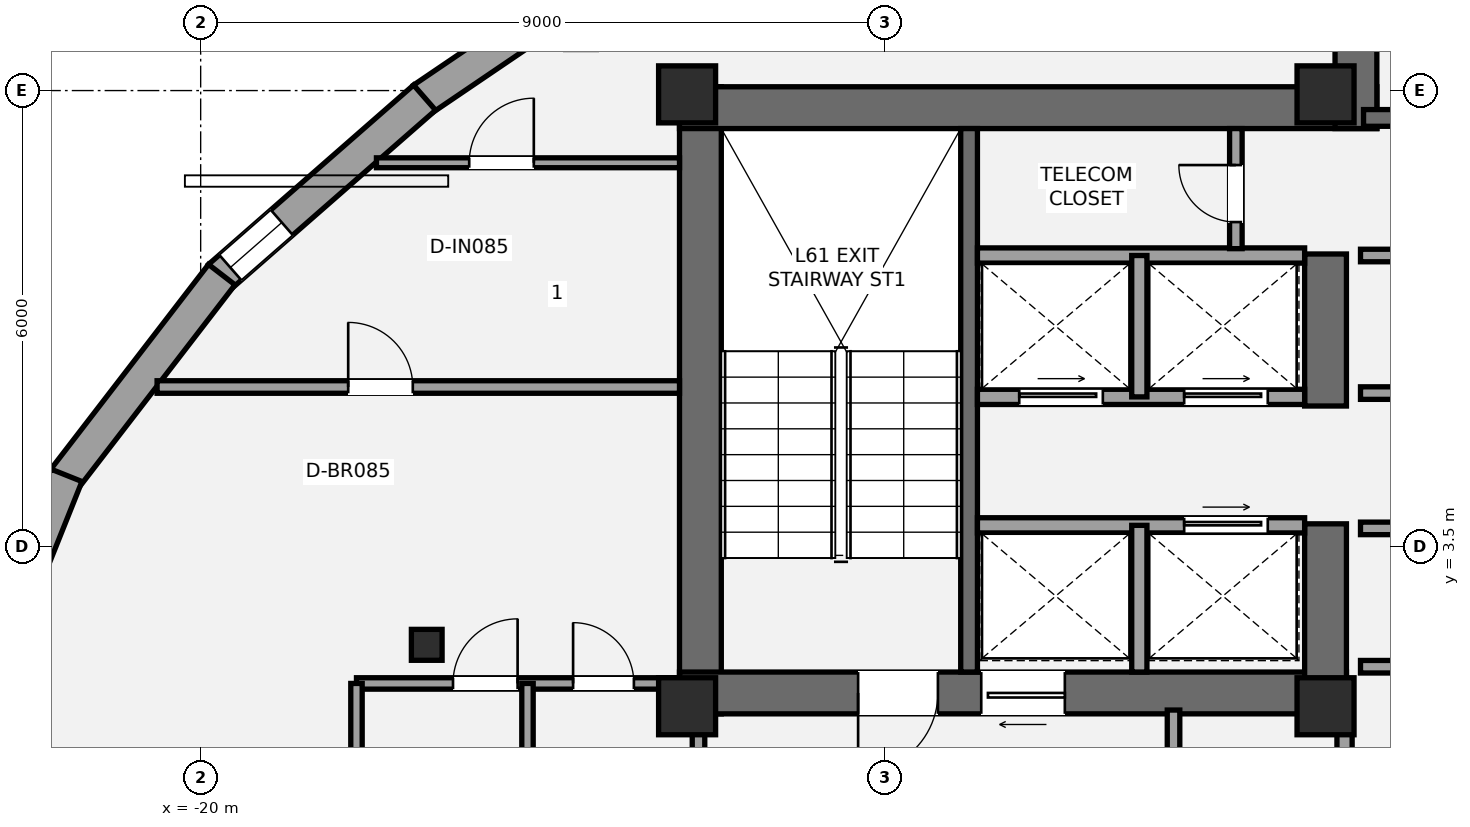
"""IFC4 building model, lengths in metres.
Left out: names, types, materials, properties, quantities, classifications, styles, units other than length and angle.
Written with IfcOpenShell. Run it as: python <this file> out.ifc"""

import sys

from ifc_helpers import new_model, si_unit, direction, frame, frame_2d, origin, origin_2d, place, context, subcontext, project, spatial, rectangle, i_section, extrude, element, fill, save


model = new_model("IFC4")
c1 = context("Model", 3, precision=1e-05, world=origin(), true_north=direction((0.0, 1.0)))
c2 = subcontext(c1, "Body", "Model", "MODEL_VIEW")
j1 = project(units=[si_unit("LENGTHUNIT", "METRE"), si_unit("PLANEANGLEUNIT", "RADIAN")], contexts=[c1])
p1 = place(None, origin())
s1 = spatial("IfcSite", under=j1, at=p1, CompositionType="ELEMENT")
p2 = place(p1, origin())
s2 = spatial("IfcBuilding", under=s1, at=p2, CompositionType="ELEMENT")
p3 = place(p2, frame((0.0, 0.0, 219.45)))
s3 = spatial("IfcBuildingStorey", under=s2, at=p3, CompositionType="ELEMENT", Elevation=219.45)
p4 = place(p3, frame((-13.425, 1.3, 0.0), z_axis=(0.0, 0.0, 1.0), x_axis=(0.0, 1.0, 0.0)))
e1 = element("IfcWall", 1, at=p4, inside=s3, PredefinedType="SHEAR", context=c2, shape_type="SweptSolid", body=[
    extrude(rectangle(XDim=8.25, YDim=0.55, at=frame_2d((4.125, 0.0))), origin(), (0.0, 0.0, 1.0), 3.15),
])
p5 = place(p3, frame((-13.7, 9.275, 0.0), z_axis=(0.0, 0.0, 1.0), x_axis=(1.0, 0.0, 0.0)))
e2 = element("IfcWall", 2, at=p5, inside=s3, PredefinedType="SHEAR", context=c2, shape_type="SweptSolid", body=[
    extrude(rectangle(XDim=9.175, YDim=0.55, at=frame_2d((4.587, 0.0))), origin(), (0.0, 0.0, 1.0), 3.15),
])
p6 = place(p3, frame((-4.925, 1.575, 0.0), z_axis=(0.0, 0.0, 1.0), x_axis=(-1.0, 0.0, 0.0)))
e3 = element("IfcWall", 3, at=p6, inside=s3, PredefinedType="SHEAR", context=c2, shape_type="SweptSolid", body=[
    extrude(rectangle(XDim=8.775, YDim=0.55, at=frame_2d((4.387, 0.0))), origin(), (0.0, 0.0, 1.0), 3.15),
])
p7 = place(p6, frame((5.375, 0.0, 0.0)))
e4 = element("IfcOpeningElement", 4, at=p7, cuts=e3, PredefinedType="OPENING", context=c2, shape_type="SweptSolid", body=[
    extrude(rectangle(XDim=1.05, YDim=2.15, at=frame_2d((0.525, 1.075))), frame((0.0, 0.285, 0.0), z_axis=(0.0, -1.0, 0.0), x_axis=(1.0, 0.0, 0.0)), (0.0, 0.0, 1.0), 0.57),
])
p8 = place(p6, frame((3.705, 0.0, 0.0)))
e5 = element("IfcOpeningElement", 5, at=p8, cuts=e3, PredefinedType="OPENING", context=c2, shape_type="SweptSolid", body=[
    extrude(rectangle(XDim=1.1, YDim=2.2, at=frame_2d((0.55, 1.1))), frame((0.0, 0.285, 0.0), z_axis=(0.0, -1.0, 0.0), x_axis=(1.0, 0.0, 0.0)), (0.0, 0.0, 1.0), 0.57),
])
p9 = place(p3, frame((-5.2, 1.3, 0.0), z_axis=(0.0, 0.0, 1.0), x_axis=(0.0, 1.0, 0.0)))
e6 = element("IfcWall", 6, at=p9, inside=s3, PredefinedType="SHEAR", context=c2, shape_type="SweptSolid", body=[
    extrude(rectangle(XDim=2.5, YDim=0.55, at=frame_2d((1.25, 0.0))), origin(), (0.0, 0.0, 1.0), 3.15),
])
p10 = place(p3, frame((-5.2, 5.35, 0.0), z_axis=(0.0, 0.0, 1.0), x_axis=(0.0, 1.0, 0.0)))
e7 = element("IfcWall", 7, at=p10, inside=s3, PredefinedType="SHEAR", context=c2, shape_type="SweptSolid", body=[
    extrude(rectangle(XDim=2.0, YDim=0.55, at=frame_2d((1.0, 0.0))), origin(), (0.0, 0.0, 1.0), 3.15),
])
p11 = place(p3, frame((-9.89, 1.85, 0.0), z_axis=(0.0, 0.0, 1.0), x_axis=(0.0, 1.0, 0.0)))
e8 = element("IfcWall", 8, at=p11, inside=s3, PredefinedType="SHEAR", context=c2, shape_type="SweptSolid", body=[
    extrude(rectangle(XDim=7.15, YDim=0.22, at=frame_2d((3.575, 0.0))), origin(), (0.0, 0.0, 1.0), 3.15),
])
p12 = place(p3, frame((-4.8, 9.0, 0.0), z_axis=(0.0, 0.0, 1.0), x_axis=(0.0, 1.0, 0.0)))
e9 = element("IfcWall", 9, at=p12, inside=s3, PredefinedType="SHEAR", context=c2, shape_type="SweptSolid", body=[
    extrude(rectangle(XDim=3.95, YDim=0.55, at=frame_2d((1.975, 0.0))), origin(), (0.0, 0.0, 1.0), 3.15),
])
p13 = place(p3, frame((-4.7, 9.14, 0.0), z_axis=(0.0, 0.0, 1.0), x_axis=(1.0, 0.0, 0.0)))
e10 = element("IfcWall", 10, at=p13, inside=s3, PredefinedType="SHEAR", context=c2, shape_type="SweptSolid", body=[
    extrude(rectangle(XDim=9.3, YDim=0.22, at=frame_2d((4.65, 0.0))), origin(), (0.0, 0.0, 1.0), 3.15),
])
p14 = place(p13, frame((1.15, 0.0, 0.0)))
e11 = element("IfcOpeningElement", 11, at=p14, cuts=e10, PredefinedType="OPENING", context=c2, shape_type="SweptSolid", body=[
    extrude(rectangle(XDim=1.05, YDim=2.15, at=frame_2d((0.525, 1.075))), frame((0.0, 0.12, 0.0), z_axis=(0.0, -1.0, 0.0), x_axis=(1.0, 0.0, 0.0)), (0.0, 0.0, 1.0), 0.24),
])
for number, where, z_axis, x_axis in (
    (12, (-13.6, 1.4, 0.0), (0.0, 0.0, 1.0), (1.0, 0.0, 0.0)),
    (13, (-13.6, 9.45, 0.0), (0.0, 0.0, 1.0), (1.0, 0.0, 0.0)),
    (14, (-5.2, 1.4, 0.0), (0.0, 0.0, 1.0), (1.0, 0.0, 0.0)),
    (15, (-5.2, 9.45, 0.0), (0.0, 0.0, 1.0), (1.0, 0.0, 0.0)),
):
    element("IfcColumn", number, at=place(p3, frame(where, z_axis=z_axis, x_axis=x_axis)), inside=s3, PredefinedType="PILASTER", context=c2, shape_type="SweptSolid", body=[
        extrude(rectangle(XDim=0.75, YDim=0.75, at=origin_2d()), origin(), (0.0, 0.0, 1.0), 3.15),
    ])
p15 = place(p3, frame((-17.026, 2.208, 0.0), z_axis=(0.0, 0.0, 1.0), x_axis=(1.0, 0.0, 0.0)))
e16 = element("IfcColumn", 16, at=p15, inside=s3, PredefinedType="COLUMN", context=c2, shape_type="SweptSolid", body=[
    extrude(i_section(OverallWidth=0.404, OverallDepth=0.407, WebThickness=0.027, FlangeThickness=0.044, at=origin_2d()), origin(), (0.0, 0.0, 1.0), 3.15),
])
p16 = place(p3, frame((-17.075, 9.39, 0.0), z_axis=(0.0, 0.0, 1.0), x_axis=(0.827609463482, 0.56130435234, 0.0)))
e17 = element("IfcWall", 17, at=p16, inside=s3, PredefinedType="STANDARD", context=c2, shape_type="SweptSolid", body=[
    extrude(rectangle(XDim=3.727, YDim=0.44, at=frame_2d((1.863, 0.0))), origin(), (0.0, 0.0, 1.0), 2.336),
])
p17 = place(p16, frame((2.577, 0.0, 0.42)))
e18 = element("IfcOpeningElement", 18, at=p17, cuts=e17, PredefinedType="OPENING", context=c2, shape_type="SweptSolid", body=[
    extrude(rectangle(XDim=0.9, YDim=1.35, at=frame_2d((0.45, 0.675))), frame((0.0, 0.23, 0.0), z_axis=(0.0, -1.0, 0.0), x_axis=(1.0, 0.0, 0.0)), (0.0, 0.0, 1.0), 0.46),
])
p18 = place(p3, frame((-19.752, 7.047, 0.0), z_axis=(0.0, 0.0, 1.0), x_axis=(0.752758077019, 0.658297256172, 0.0)))
e19 = element("IfcWall", 19, at=p18, inside=s3, PredefinedType="STANDARD", context=c2, shape_type="SweptSolid", body=[
    extrude(rectangle(XDim=3.585, YDim=0.44, at=frame_2d((1.792, 0.0))), origin(), (0.0, 0.0, 1.0), 2.336),
])
p19 = place(p18, frame((0.189, 0.0, 0.42)))
e20 = element("IfcOpeningElement", 20, at=p19, cuts=e19, PredefinedType="OPENING", context=c2, shape_type="SweptSolid", body=[
    extrude(rectangle(XDim=0.9, YDim=1.35, at=frame_2d((0.45, 0.675))), frame((0.0, 0.23, 0.0), z_axis=(0.0, -1.0, 0.0), x_axis=(1.0, 0.0, 0.0)), (0.0, 0.0, 1.0), 0.46),
])
p20 = place(p3, frame((-21.796, 4.386, 0.0), z_axis=(0.0, 0.0, 1.0), x_axis=(0.61008909013, 0.792332822811, 0.0)))
e21 = element("IfcWall", 21, at=p20, inside=s3, PredefinedType="STANDARD", context=c2, shape_type="SweptSolid", body=[
    extrude(rectangle(XDim=3.399, YDim=0.44, at=frame_2d((1.699, 0.0))), origin(), (0.0, 0.0, 1.0), 2.336),
])
p21 = place(p3, frame((-22.955, 1.465, 0.0), z_axis=(0.0, 0.0, 1.0), x_axis=(0.371272350835, 0.928524012347, 0.0)))
e22 = element("IfcWall", 22, at=p21, inside=s3, PredefinedType="STANDARD", context=c2, shape_type="SweptSolid", body=[
    extrude(rectangle(XDim=3.202, YDim=0.44, at=frame_2d((1.601, 0.0))), origin(), (0.0, 0.0, 1.0), 2.336),
])
p22 = place(p3, frame((-13.45, -2.15, 0.0), z_axis=(0.0, 0.0, 1.0), x_axis=(0.0, 1.0, 0.0)))
e23 = element("IfcWall", 23, at=p22, inside=s3, PredefinedType="PARTITIONING", context=c2, shape_type="SweptSolid", body=[
    extrude(rectangle(XDim=3.5, YDim=0.165, at=frame_2d((1.75, 0.0))), origin(), (0.0, 0.0, 1.0), 2.423),
])
p23 = place(p22, frame((0.67, 0.0, 0.0)))
e24 = element("IfcOpeningElement", 24, at=p23, cuts=e23, PredefinedType="OPENING", context=c2, shape_type="SweptSolid", body=[
    extrude(rectangle(XDim=1.05, YDim=2.15, at=frame_2d((0.525, 1.075))), frame((0.0, 0.093, 0.0), z_axis=(0.0, -1.0, 0.0), x_axis=(1.0, 0.0, 0.0)), (0.0, 0.0, 1.0), 0.185),
])
p24 = place(p3, frame((-7.2, -2.15, 0.0), z_axis=(0.0, 0.0, 1.0), x_axis=(0.0, 1.0, 0.0)))
e25 = element("IfcWall", 25, at=p24, inside=s3, PredefinedType="PARTITIONING", context=c2, shape_type="SweptSolid", body=[
    extrude(rectangle(XDim=3.5, YDim=0.165, at=frame_2d((1.75, 0.0))), origin(), (0.0, 0.0, 1.0), 2.423),
])
p25 = place(p3, frame((-4.95, -2.15, 0.0), z_axis=(0.0, 0.0, 1.0), x_axis=(0.0, 1.0, 0.0)))
e26 = element("IfcWall", 26, at=p25, inside=s3, PredefinedType="SOLIDWALL", context=c2, shape_type="SweptSolid", body=[
    extrude(rectangle(XDim=3.5, YDim=0.2, at=frame_2d((1.75, 0.0))), origin(), (0.0, 0.0, 1.0), 2.423),
])
p26 = place(p25, frame((0.95, 0.0, 0.0)))
e27 = element("IfcOpeningElement", 27, at=p26, cuts=e26, PredefinedType="OPENING", context=c2, shape_type="SweptSolid", body=[
    extrude(rectangle(XDim=0.75, YDim=2.1, at=frame_2d((0.375, 1.05))), frame((0.0, 0.11, 0.0), z_axis=(0.0, -1.0, 0.0), x_axis=(1.0, 0.0, 0.0)), (0.0, 0.0, 1.0), 0.22),
])
p27 = place(p3, frame((-9.78, 3.78, 0.0), z_axis=(0.0, 0.0, 1.0), x_axis=(1.0, 0.0, 0.0)))
e28 = element("IfcWall", 28, at=p27, inside=s3, PredefinedType="SOLIDWALL", context=c2, shape_type="SweptSolid", body=[
    extrude(rectangle(XDim=4.305, YDim=0.2, at=frame_2d((2.152, 0.0))), origin(), (0.0, 0.0, 1.0), 2.97),
])
p28 = place(p27, frame((2.72, 0.0, 0.0)))
e29 = element("IfcOpeningElement", 29, at=p28, cuts=e28, PredefinedType="OPENING", context=c2, shape_type="SweptSolid", body=[
    extrude(rectangle(XDim=1.1, YDim=2.2, at=frame_2d((0.55, 1.1))), frame((0.0, 0.11, 0.0), z_axis=(0.0, -1.0, 0.0), x_axis=(1.0, 0.0, 0.0)), (0.0, 0.0, 1.0), 0.22),
])
p29 = place(p3, frame((-7.65, 1.85, 0.0), z_axis=(0.0, 0.0, 1.0), x_axis=(0.0, 1.0, 0.0)))
e30 = element("IfcWall", 30, at=p29, inside=s3, PredefinedType="SOLIDWALL", context=c2, shape_type="SweptSolid", body=[
    extrude(rectangle(XDim=1.93, YDim=0.2, at=frame_2d((0.965, 0.0))), origin(), (0.0, 0.0, 1.0), 2.97),
])
p30 = place(p3, frame((-9.78, 5.47, 0.0), z_axis=(0.0, 0.0, 1.0), x_axis=(1.0, 0.0, 0.0)))
e31 = element("IfcWall", 31, at=p30, inside=s3, PredefinedType="SOLIDWALL", context=c2, shape_type="SweptSolid", body=[
    extrude(rectangle(XDim=4.305, YDim=0.2, at=frame_2d((2.152, 0.0))), origin(), (0.0, 0.0, 1.0), 2.97),
])
p31 = place(p30, frame((0.55, 0.0, 0.0)))
e32 = element("IfcOpeningElement", 32, at=p31, cuts=e31, PredefinedType="OPENING", context=c2, shape_type="SweptSolid", body=[
    extrude(rectangle(XDim=1.1, YDim=2.2, at=frame_2d((0.55, 1.1))), frame((0.0, 0.11, 0.0), z_axis=(0.0, -1.0, 0.0), x_axis=(1.0, 0.0, 0.0)), (0.0, 0.0, 1.0), 0.22),
])
p32 = place(p30, frame((2.72, 0.0, 0.0)))
e33 = element("IfcOpeningElement", 33, at=p32, cuts=e31, PredefinedType="OPENING", context=c2, shape_type="SweptSolid", body=[
    extrude(rectangle(XDim=1.1, YDim=2.2, at=frame_2d((0.55, 1.1))), frame((0.0, 0.11, 0.0), z_axis=(0.0, -1.0, 0.0), x_axis=(1.0, 0.0, 0.0)), (0.0, 0.0, 1.0), 0.22),
])
p33 = place(p3, frame((-9.78, 7.33, 0.0), z_axis=(0.0, 0.0, 1.0), x_axis=(1.0, 0.0, 0.0)))
e34 = element("IfcWall", 34, at=p33, inside=s3, PredefinedType="SOLIDWALL", context=c2, shape_type="SweptSolid", body=[
    extrude(rectangle(XDim=4.305, YDim=0.2, at=frame_2d((2.152, 0.0))), origin(), (0.0, 0.0, 1.0), 2.97),
])
p34 = place(p3, frame((-7.65, 5.47, 0.0), z_axis=(0.0, 0.0, 1.0), x_axis=(0.0, 1.0, 0.0)))
e35 = element("IfcWall", 35, at=p34, inside=s3, PredefinedType="SOLIDWALL", context=c2, shape_type="SweptSolid", body=[
    extrude(rectangle(XDim=1.86, YDim=0.2, at=frame_2d((0.93, 0.0))), origin(), (0.0, 0.0, 1.0), 2.97),
])
p35 = place(p3, frame((-4.74, 1.92, 0.0), z_axis=(0.0, 0.0, 1.0), x_axis=(1.0, 0.0, 0.0)))
e36 = element("IfcWall", 36, at=p35, inside=s3, PredefinedType="PARTITIONING", context=c2, shape_type="SweptSolid", body=[
    extrude(rectangle(XDim=3.89, YDim=0.165, at=frame_2d((1.945, 0.0))), origin(), (0.0, 0.0, 1.0), 2.11),
])
p36 = place(p3, frame((-4.74, 3.74, 0.0), z_axis=(0.0, 0.0, 1.0), x_axis=(1.0, 0.0, 0.0)))
e37 = element("IfcWall", 37, at=p36, inside=s3, PredefinedType="PARTITIONING", context=c2, shape_type="SweptSolid", body=[
    extrude(rectangle(XDim=3.89, YDim=0.165, at=frame_2d((1.945, 0.0))), origin(), (0.0, 0.0, 1.0), 2.97),
])
p37 = place(p36, frame((1.6, 0.0, 0.0)))
e38 = element("IfcOpeningElement", 38, at=p37, cuts=e37, PredefinedType="OPENING", context=c2, shape_type="SweptSolid", body=[
    extrude(rectangle(XDim=0.85, YDim=2.1, at=frame_2d((0.425, 1.05))), frame((0.0, 0.093, 0.0), z_axis=(0.0, -1.0, 0.0), x_axis=(1.0, 0.0, 0.0)), (0.0, 0.0, 1.0), 0.185),
])
p38 = place(p3, frame((-4.74, 5.52, 0.0), z_axis=(0.0, 0.0, 1.0), x_axis=(1.0, 0.0, 0.0)))
e39 = element("IfcWall", 39, at=p38, inside=s3, PredefinedType="PARTITIONING", context=c2, shape_type="SweptSolid", body=[
    extrude(rectangle(XDim=3.89, YDim=0.165, at=frame_2d((1.945, 0.0))), origin(), (0.0, 0.0, 1.0), 2.97),
])
p39 = place(p38, frame((1.6, 0.0, 0.0)))
e40 = element("IfcOpeningElement", 40, at=p39, cuts=e39, PredefinedType="OPENING", context=c2, shape_type="SweptSolid", body=[
    extrude(rectangle(XDim=0.85, YDim=2.1, at=frame_2d((0.425, 1.05))), frame((0.0, 0.093, 0.0), z_axis=(0.0, -1.0, 0.0), x_axis=(1.0, 0.0, 0.0)), (0.0, 0.0, 1.0), 0.185),
])
p40 = place(p3, frame((-4.74, 7.33, 0.0), z_axis=(0.0, 0.0, 1.0), x_axis=(1.0, 0.0, 0.0)))
e41 = element("IfcWall", 41, at=p40, inside=s3, PredefinedType="PARTITIONING", context=c2, shape_type="SweptSolid", body=[
    extrude(rectangle(XDim=3.89, YDim=0.165, at=frame_2d((1.945, 0.0))), origin(), (0.0, 0.0, 1.0), 2.97),
])
p41 = place(p3, frame((-6.38, 7.42, 0.0), z_axis=(0.0, 0.0, 1.0), x_axis=(0.0, 1.0, 0.0)))
e42 = element("IfcWall", 42, at=p41, inside=s3, PredefinedType="PARTITIONING", context=c2, shape_type="SweptSolid", body=[
    extrude(rectangle(XDim=1.58, YDim=0.165, at=frame_2d((0.79, 0.0))), origin(), (0.0, 0.0, 1.0), 2.97),
])
p42 = place(p41, frame((0.35, 0.0, 0.0)))
e43 = element("IfcOpeningElement", 43, at=p42, cuts=e42, PredefinedType="OPENING", context=c2, shape_type="SweptSolid", body=[
    extrude(rectangle(XDim=0.75, YDim=2.1, at=frame_2d((0.375, 1.05))), frame((0.0, 0.093, 0.0), z_axis=(0.0, -1.0, 0.0), x_axis=(1.0, 0.0, 0.0)), (0.0, 0.0, 1.0), 0.185),
])
p43 = place(p3, frame((-20.573, 5.6, 0.0), z_axis=(0.0, 0.0, 1.0), x_axis=(1.0, 0.0, 0.0)))
e44 = element("IfcWall", 44, at=p43, inside=s3, PredefinedType="PARTITIONING", context=c2, shape_type="SweptSolid", body=[
    extrude(rectangle(XDim=6.874, YDim=0.165, at=frame_2d((3.437, 0.0))), origin(), (0.0, 0.0, 1.0), 2.423),
])
p44 = place(p43, frame((2.514, 0.0, 0.0)))
e45 = element("IfcOpeningElement", 45, at=p44, cuts=e44, PredefinedType="OPENING", context=c2, shape_type="SweptSolid", body=[
    extrude(rectangle(XDim=0.85, YDim=2.1, at=frame_2d((0.425, 1.05))), frame((0.0, 0.093, 0.0), z_axis=(0.0, -1.0, 0.0), x_axis=(1.0, 0.0, 0.0)), (0.0, 0.0, 1.0), 0.185),
])
p45 = place(p3, frame((-17.95, 1.7, 0.0), z_axis=(0.0, 0.0, 1.0), x_axis=(1.0, 0.0, 0.0)))
e46 = element("IfcWall", 46, at=p45, inside=s3, PredefinedType="PLUMBINGWALL", context=c2, shape_type="SweptSolid", body=[
    extrude(rectangle(XDim=4.25, YDim=0.15, at=frame_2d((2.125, 0.0))), origin(), (0.0, 0.0, 1.0), 2.423),
])
p46 = place(p45, frame((2.85, 0.0, 0.0)))
e47 = element("IfcOpeningElement", 47, at=p46, cuts=e46, PredefinedType="OPENING", context=c2, shape_type="SweptSolid", body=[
    extrude(rectangle(XDim=0.8, YDim=2.1, at=frame_2d((0.4, 1.05))), frame((0.0, 0.085, 0.0), z_axis=(0.0, -1.0, 0.0), x_axis=(1.0, 0.0, 0.0)), (0.0, 0.0, 1.0), 0.17),
])
p47 = place(p45, frame((1.27, 0.0, 0.0)))
e48 = element("IfcOpeningElement", 48, at=p47, cuts=e46, PredefinedType="OPENING", context=c2, shape_type="SweptSolid", body=[
    extrude(rectangle(XDim=0.85, YDim=2.1, at=frame_2d((0.425, 1.05))), frame((0.0, 0.085, 0.0), z_axis=(0.0, -1.0, 0.0), x_axis=(1.0, 0.0, 0.0)), (0.0, 0.0, 1.0), 0.17),
])
p48 = place(p3, frame((-15.7, -0.35, 0.0), z_axis=(0.0, 0.0, 1.0), x_axis=(0.0, 1.0, 0.0)))
e49 = element("IfcWall", 49, at=p48, inside=s3, PredefinedType="PLUMBINGWALL", context=c2, shape_type="SweptSolid", body=[
    extrude(rectangle(XDim=2.05, YDim=0.15, at=frame_2d((1.025, 0.0))), origin(), (0.0, 0.0, 1.0), 2.97),
])
p49 = place(p3, frame((-17.95, -0.35, 0.0), z_axis=(0.0, 0.0, 1.0), x_axis=(0.0, 1.0, 0.0)))
e50 = element("IfcWall", 50, at=p49, inside=s3, PredefinedType="PLUMBINGWALL", context=c2, shape_type="SweptSolid", body=[
    extrude(rectangle(XDim=2.05, YDim=0.15, at=frame_2d((1.025, 0.0))), origin(), (0.0, 0.0, 1.0), 2.423),
])
p50 = place(p3, frame((-17.688, 8.55, 0.0), z_axis=(0.0, 0.0, 1.0), x_axis=(1.0, 0.0, 0.0)))
e51 = element("IfcWall", 51, at=p50, inside=s3, PredefinedType="PARTITIONING", context=c2, shape_type="SweptSolid", body=[
    extrude(rectangle(XDim=3.988, YDim=0.13, at=frame_2d((1.994, 0.0))), origin(), (0.0, 0.0, 1.0), 2.423),
])
p51 = place(p50, frame((1.221, 0.0, 0.0)))
e52 = element("IfcOpeningElement", 52, at=p51, cuts=e51, PredefinedType="OPENING", context=c2, shape_type="SweptSolid", body=[
    extrude(rectangle(XDim=0.85, YDim=2.1, at=frame_2d((0.425, 1.05))), frame((0.0, 0.075, 0.0), z_axis=(0.0, -1.0, 0.0), x_axis=(1.0, 0.0, 0.0)), (0.0, 0.0, 1.0), 0.15),
])
p52 = place(p19, origin())
e53 = element("IfcWindow", 53, at=p52, inside=s3, PartitioningType="SINGLE_PANEL", PredefinedType="WINDOW", context=c2, shape_type="SweptSolid", body=[
    extrude(rectangle(XDim=0.9, YDim=1.35, at=frame_2d((0.45, 0.675))), frame((0.0, -0.01, 0.0), z_axis=(0.0, -1.0, 0.0), x_axis=(1.0, 0.0, 0.0)), (0.0, 0.0, 1.0), 0.06),
])
fill(e20, e53)
p53 = place(p7, origin())
e54 = element("IfcDoor", 54, at=p53, inside=s3, OperationType="SINGLE_SWING_RIGHT", PredefinedType="DOOR", context=c2, shape_type="SweptSolid", body=[
    extrude(rectangle(XDim=1.05, YDim=2.15, at=frame_2d((0.525, 1.075))), frame((0.0, 0.025, 0.0), z_axis=(0.0, -1.0, 0.0), x_axis=(1.0, 0.0, 0.0)), (0.0, 0.0, 1.0), 0.05),
])
fill(e4, e54)
p54 = place(p8, origin())
e55 = element("IfcDoor", 55, at=p54, inside=s3, OperationType="SLIDING_TO_LEFT", PredefinedType="DOOR", context=c2, shape_type="SweptSolid", body=[
    extrude(rectangle(XDim=1.1, YDim=2.2, at=frame_2d((0.55, 1.1))), frame((0.0, 0.025, 0.0), z_axis=(0.0, -1.0, 0.0), x_axis=(1.0, 0.0, 0.0)), (0.0, 0.0, 1.0), 0.05),
])
fill(e5, e55)
p55 = place(p31, origin())
e56 = element("IfcDoor", 56, at=p55, inside=s3, OperationType="SLIDING_TO_LEFT", PredefinedType="DOOR", context=c2, shape_type="SweptSolid", body=[
    extrude(rectangle(XDim=1.1, YDim=2.2, at=frame_2d((0.55, 1.1))), frame((0.0, 0.025, 0.0), z_axis=(0.0, -1.0, 0.0), x_axis=(1.0, 0.0, 0.0)), (0.0, 0.0, 1.0), 0.05),
])
fill(e32, e56)
p56 = place(p32, origin())
e57 = element("IfcDoor", 57, at=p56, inside=s3, OperationType="SLIDING_TO_LEFT", PredefinedType="DOOR", context=c2, shape_type="SweptSolid", body=[
    extrude(rectangle(XDim=1.1, YDim=2.2, at=frame_2d((0.55, 1.1))), frame((0.0, 0.025, 0.0), z_axis=(0.0, -1.0, 0.0), x_axis=(1.0, 0.0, 0.0)), (0.0, 0.0, 1.0), 0.05),
])
fill(e33, e57)
p57 = place(p28, origin())
e58 = element("IfcDoor", 58, at=p57, inside=s3, OperationType="SLIDING_TO_LEFT", PredefinedType="DOOR", context=c2, shape_type="SweptSolid", body=[
    extrude(rectangle(XDim=1.1, YDim=2.2, at=frame_2d((0.55, 1.1))), frame((0.0, 0.025, 0.0), z_axis=(0.0, -1.0, 0.0), x_axis=(1.0, 0.0, 0.0)), (0.0, 0.0, 1.0), 0.05),
])
fill(e29, e58)
p58 = place(p42, origin())
e59 = element("IfcDoor", 59, at=p58, inside=s3, OperationType="SINGLE_SWING_RIGHT", PredefinedType="DOOR", context=c2, shape_type="SweptSolid", body=[
    extrude(rectangle(XDim=0.75, YDim=2.1, at=frame_2d((0.375, 1.05))), frame((0.0, 0.025, 0.0), z_axis=(0.0, -1.0, 0.0), x_axis=(1.0, 0.0, 0.0)), (0.0, 0.0, 1.0), 0.05),
])
fill(e43, e59)
p59 = place(p46, origin())
e60 = element("IfcDoor", 60, at=p59, inside=s3, OperationType="SINGLE_SWING_LEFT", PredefinedType="DOOR", context=c2, shape_type="SweptSolid", body=[
    extrude(rectangle(XDim=0.8, YDim=2.1, at=frame_2d((0.4, 1.05))), frame((0.0, 0.025, 0.0), z_axis=(0.0, -1.0, 0.0), x_axis=(1.0, 0.0, 0.0)), (0.0, 0.0, 1.0), 0.05),
])
fill(e47, e60)
p60 = place(p47, origin())
e61 = element("IfcDoor", 61, at=p60, inside=s3, OperationType="SINGLE_SWING_RIGHT", PredefinedType="DOOR", context=c2, shape_type="SweptSolid", body=[
    extrude(rectangle(XDim=0.85, YDim=2.1, at=frame_2d((0.425, 1.05))), frame((0.0, 0.025, 0.0), z_axis=(0.0, -1.0, 0.0), x_axis=(1.0, 0.0, 0.0)), (0.0, 0.0, 1.0), 0.05),
])
fill(e48, e61)
p61 = place(p44, origin())
e62 = element("IfcDoor", 62, at=p61, inside=s3, OperationType="SINGLE_SWING_LEFT", PredefinedType="DOOR", context=c2, shape_type="SweptSolid", body=[
    extrude(rectangle(XDim=0.85, YDim=2.1, at=frame_2d((0.425, 1.05))), frame((0.0, 0.025, 0.0), z_axis=(0.0, -1.0, 0.0), x_axis=(1.0, 0.0, 0.0)), (0.0, 0.0, 1.0), 0.05),
])
fill(e45, e62)
p62 = place(p51, origin())
e63 = element("IfcDoor", 63, at=p62, inside=s3, OperationType="SINGLE_SWING_RIGHT", PredefinedType="DOOR", context=c2, shape_type="SweptSolid", body=[
    extrude(rectangle(XDim=0.85, YDim=2.1, at=frame_2d((0.425, 1.05))), frame((0.0, 0.025, 0.0), z_axis=(0.0, -1.0, 0.0), x_axis=(1.0, 0.0, 0.0)), (0.0, 0.0, 1.0), 0.05),
])
fill(e52, e63)
save(model, sys.argv[1])
